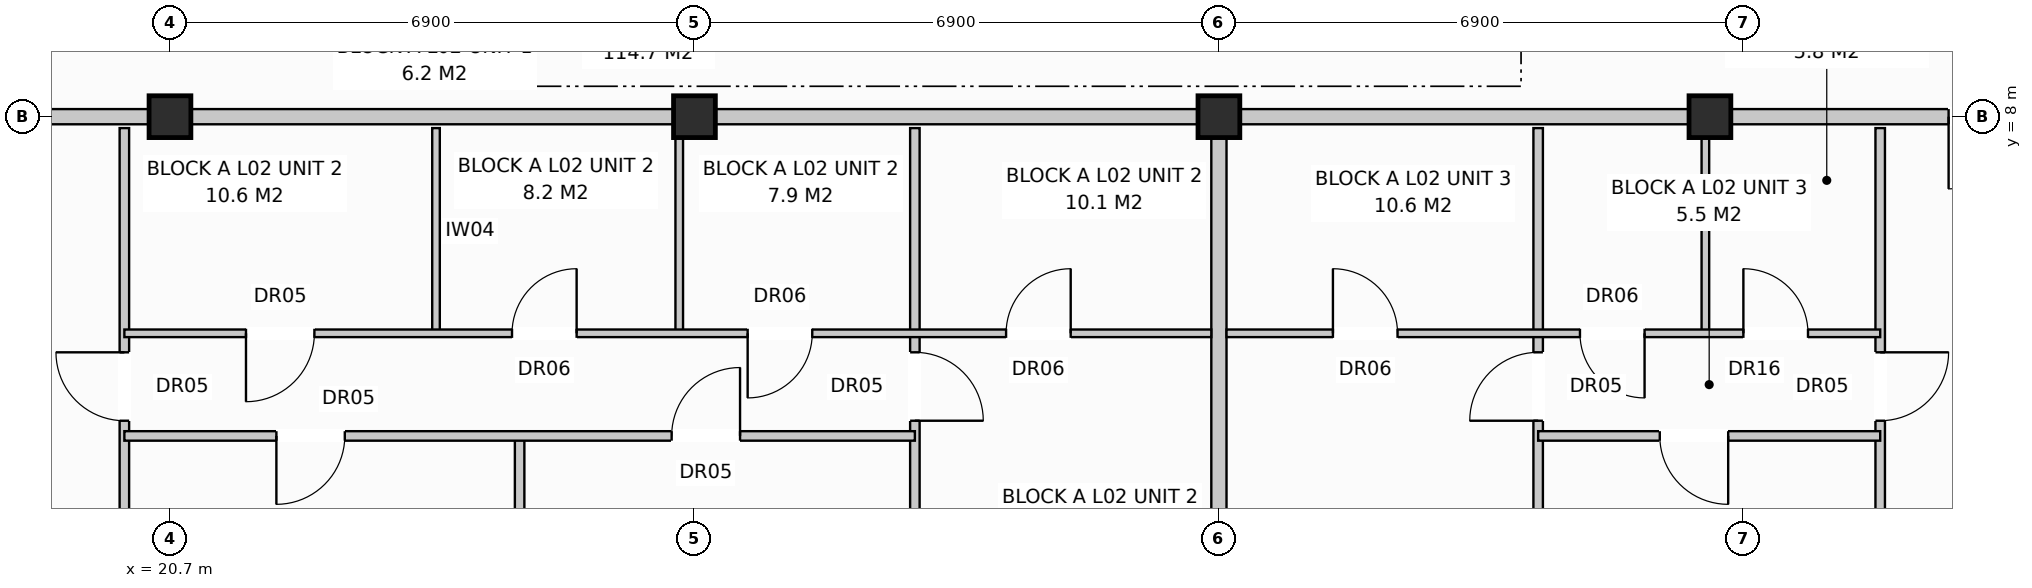
"""IFC4 building model, lengths in metres.
Left out: names, types, materials, properties, quantities, classifications, styles, units other than length and angle.
Written with IfcOpenShell. Run it as: python <this file> out.ifc"""

import sys

from ifc_helpers import new_model, si_unit, direction, frame, frame_2d, origin, origin_with_axes, origin_2d, place, context, subcontext, project, spatial, rectangle, extrude, element, fill, save


model = new_model("IFC4")
c1 = context("Model", 3, precision=1e-05, world=origin(), true_north=direction((0.0, 1.0)))
c2 = subcontext(c1, "Body", "Model", "MODEL_VIEW")
j1 = project(units=[si_unit("LENGTHUNIT", "METRE"), si_unit("PLANEANGLEUNIT", "RADIAN")], contexts=[c1])
p1 = place(None, origin())
s1 = spatial("IfcSite", under=j1, at=p1, CompositionType="ELEMENT")
p2 = place(p1, origin())
s2 = spatial("IfcBuilding", under=s1, at=p2, CompositionType="ELEMENT")
p3 = place(p2, frame((0.0, 0.0, 8.0)))
s3 = spatial("IfcBuildingStorey", under=s2, at=p3, CompositionType="ELEMENT", Elevation=8.0)
for number, where, z_axis, x_axis in (
    (1, (20.7, 8.0, 0.0), (0.0, 0.0, 1.0), (1.0, 0.0, 0.0)),
    (2, (27.6, 8.0, 0.0), (0.0, 0.0, 1.0), (1.0, 0.0, 0.0)),
    (3, (34.5, 8.0, 0.0), (0.0, 0.0, 1.0), (1.0, 0.0, 0.0)),
    (4, (40.96, 8.0, 0.0), (0.0, 0.0, 1.0), (1.0, 0.0, 0.0)),
):
    element("IfcColumn", number, at=place(p3, frame(where, z_axis=z_axis, x_axis=x_axis)), inside=s3, PredefinedType="COLUMN", context=c2, shape_type="SweptSolid", body=[
        extrude(rectangle(XDim=0.55, YDim=0.55, at=origin_2d()), origin(), (0.0, 0.0, 1.0), 3.2),
    ])
p4 = place(p3, frame((34.5, 7.85, 0.0), z_axis=(0.0, 0.0, 1.0), x_axis=(0.0, -1.0, 0.0)))
e5 = element("IfcWall", 5, at=p4, inside=s3, PredefinedType="PARTITIONING", context=c2, shape_type="SweptSolid", body=[
    extrude(rectangle(XDim=7.7, YDim=0.2, at=frame_2d((3.85, 0.0))), origin(), (0.0, 0.0, 1.0), 2.94),
])
p5 = place(p3, frame((13.8, 8.0, 0.0), z_axis=(0.0, 0.0, 1.0), x_axis=(1.0, 0.0, 0.0)))
e6 = element("IfcWall", 6, at=p5, inside=s3, PredefinedType="PARTITIONING", context=c2, shape_type="SweptSolid", body=[
    extrude(rectangle(XDim=20.7, YDim=0.2, at=frame_2d((10.35, 0.0))), origin(), (0.0, 0.0, 1.0), 2.38),
])
p6 = place(p5, frame((2.4, 0.0, 0.0)))
e7 = element("IfcOpeningElement", 7, at=p6, cuts=e6, PredefinedType="OPENING", context=c2, shape_type="SweptSolid", body=[
    extrude(rectangle(XDim=0.95, YDim=2.15, at=frame_2d((0.475, 1.075))), frame((0.0, 0.112, 0.0), z_axis=(0.0, -1.0, 0.0), x_axis=(1.0, 0.0, 0.0)), (0.0, 0.0, 1.0), 0.224),
])
p7 = place(p3, frame((20.1, 7.85, 0.0), z_axis=(0.0, 0.0, 1.0), x_axis=(0.0, -1.0, 0.0)))
e8 = element("IfcWall", 8, at=p7, inside=s3, PredefinedType="PARTITIONING", context=c2, shape_type="SweptSolid", body=[
    extrude(rectangle(XDim=7.65, YDim=0.125, at=frame_2d((3.825, 0.0))), origin(), (0.0, 0.0, 1.0), 2.94),
])
p8 = place(p7, frame((2.95, 0.0, 0.0)))
e9 = element("IfcOpeningElement", 9, at=p8, cuts=e8, PredefinedType="OPENING", context=c2, shape_type="SweptSolid", body=[
    extrude(rectangle(XDim=0.9, YDim=2.1, at=frame_2d((0.45, 1.05))), frame((0.0, 0.074, 0.0), z_axis=(0.0, -1.0, 0.0), x_axis=(1.0, 0.0, 0.0)), (0.0, 0.0, 1.0), 0.149),
])
for number, where, z_axis, x_axis in (
    (10, (24.2, 7.85, 0.0), (0.0, 0.0, 1.0), (0.0, -1.0, 0.0)),
    (11, (27.4, 7.85, 0.0), (0.0, 0.0, 1.0), (0.0, -1.0, 0.0)),
):
    element("IfcWall", number, at=place(p3, frame(where, z_axis=z_axis, x_axis=x_axis)), inside=s3, PredefinedType="PARTITIONING", context=c2, shape_type="SweptSolid", body=[
        extrude(rectangle(XDim=2.7, YDim=0.1, at=frame_2d((1.35, 0.0))), origin(), (0.0, 0.0, 1.0), 2.94),
    ])
p9 = place(p3, frame((25.3, 3.8, 0.0), z_axis=(0.0, 0.0, 1.0), x_axis=(0.0, -1.0, 0.0)))
e12 = element("IfcWall", 12, at=p9, inside=s3, PredefinedType="PARTITIONING", context=c2, shape_type="SweptSolid", body=[
    extrude(rectangle(XDim=3.6, YDim=0.125, at=frame_2d((1.8, 0.0))), origin(), (0.0, 0.0, 1.0), 2.59),
])
p10 = place(p3, frame((30.5, 7.85, 0.0), z_axis=(0.0, 0.0, 1.0), x_axis=(0.0, -1.0, 0.0)))
e13 = element("IfcWall", 13, at=p10, inside=s3, PredefinedType="PARTITIONING", context=c2, shape_type="SweptSolid", body=[
    extrude(rectangle(XDim=7.65, YDim=0.125, at=frame_2d((3.825, 0.0))), origin(), (0.0, 0.0, 1.0), 2.94),
])
p11 = place(p10, frame((2.95, 0.0, 0.0)))
e14 = element("IfcOpeningElement", 14, at=p11, cuts=e13, PredefinedType="OPENING", context=c2, shape_type="SweptSolid", body=[
    extrude(rectangle(XDim=0.9, YDim=2.1, at=frame_2d((0.45, 1.05))), frame((0.0, 0.074, 0.0), z_axis=(0.0, -1.0, 0.0), x_axis=(1.0, 0.0, 0.0)), (0.0, 0.0, 1.0), 0.149),
])
p12 = place(p3, frame((20.1, 5.15, 0.0), z_axis=(0.0, 0.0, 1.0), x_axis=(1.0, 0.0, 0.0)))
e15 = element("IfcWall", 15, at=p12, inside=s3, PredefinedType="PARTITIONING", context=c2, shape_type="SweptSolid", body=[
    extrude(rectangle(XDim=14.3, YDim=0.1, at=frame_2d((7.15, 0.0))), origin(), (0.0, 0.0, 1.0), 2.94),
])
p13 = place(p12, frame((1.6, 0.0, 0.0)))
e16 = element("IfcOpeningElement", 16, at=p13, cuts=e15, PredefinedType="OPENING", context=c2, shape_type="SweptSolid", body=[
    extrude(rectangle(XDim=0.9, YDim=2.1, at=frame_2d((0.45, 1.05))), frame((0.0, 0.062, 0.0), z_axis=(0.0, -1.0, 0.0), x_axis=(1.0, 0.0, 0.0)), (0.0, 0.0, 1.0), 0.124),
])
p14 = place(p12, frame((5.1, 0.0, 0.0)))
e17 = element("IfcOpeningElement", 17, at=p14, cuts=e15, PredefinedType="OPENING", context=c2, shape_type="SweptSolid", body=[
    extrude(rectangle(XDim=0.85, YDim=2.05, at=frame_2d((0.425, 1.025))), frame((0.0, 0.062, 0.0), z_axis=(0.0, -1.0, 0.0), x_axis=(1.0, 0.0, 0.0)), (0.0, 0.0, 1.0), 0.124),
])
p15 = place(p12, frame((8.2, 0.0, 0.0)))
e18 = element("IfcOpeningElement", 18, at=p15, cuts=e15, PredefinedType="OPENING", context=c2, shape_type="SweptSolid", body=[
    extrude(rectangle(XDim=0.85, YDim=2.05, at=frame_2d((0.425, 1.025))), frame((0.0, 0.062, 0.0), z_axis=(0.0, -1.0, 0.0), x_axis=(1.0, 0.0, 0.0)), (0.0, 0.0, 1.0), 0.124),
])
p16 = place(p12, frame((11.6, 0.0, 0.0)))
e19 = element("IfcOpeningElement", 19, at=p16, cuts=e15, PredefinedType="OPENING", context=c2, shape_type="SweptSolid", body=[
    extrude(rectangle(XDim=0.85, YDim=2.05, at=frame_2d((0.425, 1.025))), frame((0.0, 0.062, 0.0), z_axis=(0.0, -1.0, 0.0), x_axis=(1.0, 0.0, 0.0)), (0.0, 0.0, 1.0), 0.124),
])
p17 = place(p3, frame((20.1, 3.8, 0.0), z_axis=(0.0, 0.0, 1.0), x_axis=(1.0, 0.0, 0.0)))
e20 = element("IfcWall", 20, at=p17, inside=s3, PredefinedType="PARTITIONING", context=c2, shape_type="SweptSolid", body=[
    extrude(rectangle(XDim=10.4, YDim=0.125, at=frame_2d((5.2, 0.0))), origin(), (0.0, 0.0, 1.0), 2.94),
])
p18 = place(p17, frame((2.0, 0.0, 0.0)))
e21 = element("IfcOpeningElement", 21, at=p18, cuts=e20, PredefinedType="OPENING", context=c2, shape_type="SweptSolid", body=[
    extrude(rectangle(XDim=0.9, YDim=2.1, at=frame_2d((0.45, 1.05))), frame((0.0, 0.074, 0.0), z_axis=(0.0, -1.0, 0.0), x_axis=(1.0, 0.0, 0.0)), (0.0, 0.0, 1.0), 0.149),
])
p19 = place(p17, frame((7.2, 0.0, 0.0)))
e22 = element("IfcOpeningElement", 22, at=p19, cuts=e20, PredefinedType="OPENING", context=c2, shape_type="SweptSolid", body=[
    extrude(rectangle(XDim=0.9, YDim=2.1, at=frame_2d((0.45, 1.05))), frame((0.0, 0.074, 0.0), z_axis=(0.0, -1.0, 0.0), x_axis=(1.0, 0.0, 0.0)), (0.0, 0.0, 1.0), 0.149),
])
p20 = place(p3, frame((34.5, 8.0, 0.0), z_axis=(0.0, 0.0, 1.0), x_axis=(1.0, 0.0, 0.0)))
e23 = element("IfcWall", 23, at=p20, inside=s3, PredefinedType="PARTITIONING", context=c2, shape_type="SweptSolid", body=[
    extrude(rectangle(XDim=13.8, YDim=0.2, at=frame_2d((6.9, 0.0))), origin(), (0.0, 0.0, 1.0), 2.38),
])
p21 = place(p20, frame((9.6, 0.0, 0.0)))
e24 = element("IfcOpeningElement", 24, at=p21, cuts=e23, PredefinedType="OPENING", context=c2, shape_type="SweptSolid", body=[
    extrude(rectangle(XDim=0.95, YDim=2.15, at=frame_2d((0.475, 1.075))), frame((0.0, 0.112, 0.0), z_axis=(0.0, -1.0, 0.0), x_axis=(1.0, 0.0, 0.0)), (0.0, 0.0, 1.0), 0.224),
])
p22 = place(p3, frame((43.2, 7.85, 0.0), z_axis=(0.0, 0.0, 1.0), x_axis=(0.0, -1.0, 0.0)))
e25 = element("IfcWall", 25, at=p22, inside=s3, PredefinedType="PARTITIONING", context=c2, shape_type="SweptSolid", body=[
    extrude(rectangle(XDim=7.65, YDim=0.125, at=frame_2d((3.825, 0.0))), origin(), (0.0, 0.0, 1.0), 2.59),
])
p23 = place(p22, frame((2.95, 0.0, 0.0)))
e26 = element("IfcOpeningElement", 26, at=p23, cuts=e25, PredefinedType="OPENING", context=c2, shape_type="SweptSolid", body=[
    extrude(rectangle(XDim=0.9, YDim=2.1, at=frame_2d((0.45, 1.05))), frame((0.0, 0.074, 0.0), z_axis=(0.0, -1.0, 0.0), x_axis=(1.0, 0.0, 0.0)), (0.0, 0.0, 1.0), 0.149),
])
p24 = place(p3, frame((38.7, 7.85, 0.0), z_axis=(0.0, 0.0, 1.0), x_axis=(0.0, -1.0, 0.0)))
e27 = element("IfcWall", 27, at=p24, inside=s3, PredefinedType="PARTITIONING", context=c2, shape_type="SweptSolid", body=[
    extrude(rectangle(XDim=7.65, YDim=0.125, at=frame_2d((3.825, 0.0))), origin(), (0.0, 0.0, 1.0), 2.94),
])
p25 = place(p24, frame((2.95, 0.0, 0.0)))
e28 = element("IfcOpeningElement", 28, at=p25, cuts=e27, PredefinedType="OPENING", context=c2, shape_type="SweptSolid", body=[
    extrude(rectangle(XDim=0.9, YDim=2.1, at=frame_2d((0.45, 1.05))), frame((0.0, 0.074, 0.0), z_axis=(0.0, -1.0, 0.0), x_axis=(1.0, 0.0, 0.0)), (0.0, 0.0, 1.0), 0.149),
])
p26 = place(p3, frame((40.9, 7.85, 0.0), z_axis=(0.0, 0.0, 1.0), x_axis=(0.0, -1.0, 0.0)))
e29 = element("IfcWall", 29, at=p26, inside=s3, PredefinedType="PARTITIONING", context=c2, shape_type="SweptSolid", body=[
    extrude(rectangle(XDim=2.7, YDim=0.1, at=frame_2d((1.35, 0.0))), origin(), (0.0, 0.0, 1.0), 2.94),
])
p27 = place(p3, frame((34.6, 5.15, 0.0), z_axis=(0.0, 0.0, 1.0), x_axis=(1.0, 0.0, 0.0)))
e30 = element("IfcWall", 30, at=p27, inside=s3, PredefinedType="PARTITIONING", context=c2, shape_type="SweptSolid", body=[
    extrude(rectangle(XDim=8.6, YDim=0.1, at=frame_2d((4.3, 0.0))), origin(), (0.0, 0.0, 1.0), 2.94),
])
p28 = place(p27, frame((1.4, 0.0, 0.0)))
e31 = element("IfcOpeningElement", 31, at=p28, cuts=e30, PredefinedType="OPENING", context=c2, shape_type="SweptSolid", body=[
    extrude(rectangle(XDim=0.85, YDim=2.05, at=frame_2d((0.425, 1.025))), frame((0.0, 0.062, 0.0), z_axis=(0.0, -1.0, 0.0), x_axis=(1.0, 0.0, 0.0)), (0.0, 0.0, 1.0), 0.124),
])
p29 = place(p27, frame((4.65, 0.0, 0.0)))
e32 = element("IfcOpeningElement", 32, at=p29, cuts=e30, PredefinedType="OPENING", context=c2, shape_type="SweptSolid", body=[
    extrude(rectangle(XDim=0.85, YDim=2.05, at=frame_2d((0.425, 1.025))), frame((0.0, 0.062, 0.0), z_axis=(0.0, -1.0, 0.0), x_axis=(1.0, 0.0, 0.0)), (0.0, 0.0, 1.0), 0.124),
])
p30 = place(p27, frame((6.8, 0.0, 0.0)))
e33 = element("IfcOpeningElement", 33, at=p30, cuts=e30, PredefinedType="OPENING", context=c2, shape_type="SweptSolid", body=[
    extrude(rectangle(XDim=0.85, YDim=2.1, at=frame_2d((0.425, 1.05))), frame((0.0, 0.062, 0.0), z_axis=(0.0, -1.0, 0.0), x_axis=(1.0, 0.0, 0.0)), (0.0, 0.0, 1.0), 0.124),
])
p31 = place(p3, frame((38.7, 3.8, 0.0), z_axis=(0.0, 0.0, 1.0), x_axis=(1.0, 0.0, 0.0)))
e34 = element("IfcWall", 34, at=p31, inside=s3, PredefinedType="PARTITIONING", context=c2, shape_type="SweptSolid", body=[
    extrude(rectangle(XDim=4.5, YDim=0.125, at=frame_2d((2.25, 0.0))), origin(), (0.0, 0.0, 1.0), 2.94),
])
p32 = place(p31, frame((1.6, 0.0, 0.0)))
e35 = element("IfcOpeningElement", 35, at=p32, cuts=e34, PredefinedType="OPENING", context=c2, shape_type="SweptSolid", body=[
    extrude(rectangle(XDim=0.9, YDim=2.1, at=frame_2d((0.45, 1.05))), frame((0.0, 0.074, 0.0), z_axis=(0.0, -1.0, 0.0), x_axis=(1.0, 0.0, 0.0)), (0.0, 0.0, 1.0), 0.149),
])
p33 = place(p8, frame((0.9, 0.0, 0.0), z_axis=(0.0, 0.0, 1.0), x_axis=(-1.0, 0.0, 0.0)))
e36 = element("IfcDoor", 36, at=p33, inside=s3, OperationType="SINGLE_SWING_LEFT", PredefinedType="DOOR", context=c2, shape_type="SweptSolid", body=[
    extrude(rectangle(XDim=0.9, YDim=2.1, at=frame_2d((0.45, 1.05))), frame((0.0, 0.025, 0.0), z_axis=(0.0, -1.0, 0.0), x_axis=(1.0, 0.0, 0.0)), (0.0, 0.0, 1.0), 0.05),
])
fill(e9, e36)
p34 = place(p11, origin_with_axes())
e37 = element("IfcDoor", 37, at=p34, inside=s3, OperationType="SINGLE_SWING_RIGHT", PredefinedType="DOOR", context=c2, shape_type="SweptSolid", body=[
    extrude(rectangle(XDim=0.9, YDim=2.1, at=frame_2d((0.45, 1.05))), frame((0.0, 0.025, 0.0), z_axis=(0.0, -1.0, 0.0), x_axis=(1.0, 0.0, 0.0)), (0.0, 0.0, 1.0), 0.05),
])
fill(e14, e37)
p35 = place(p13, frame((0.9, 0.0, 0.0), z_axis=(0.0, 0.0, 1.0), x_axis=(-1.0, 0.0, 0.0)))
e38 = element("IfcDoor", 38, at=p35, inside=s3, OperationType="SINGLE_SWING_LEFT", PredefinedType="DOOR", context=c2, shape_type="SweptSolid", body=[
    extrude(rectangle(XDim=0.9, YDim=2.1, at=frame_2d((0.45, 1.05))), frame((0.0, 0.025, 0.0), z_axis=(0.0, -1.0, 0.0), x_axis=(1.0, 0.0, 0.0)), (0.0, 0.0, 1.0), 0.05),
])
fill(e16, e38)
p36 = place(p14, origin_with_axes())
e39 = element("IfcDoor", 39, at=p36, inside=s3, OperationType="SINGLE_SWING_RIGHT", PredefinedType="DOOR", context=c2, shape_type="SweptSolid", body=[
    extrude(rectangle(XDim=0.85, YDim=2.05, at=frame_2d((0.425, 1.025))), frame((0.0, 0.025, 0.0), z_axis=(0.0, -1.0, 0.0), x_axis=(1.0, 0.0, 0.0)), (0.0, 0.0, 1.0), 0.05),
])
fill(e17, e39)
p37 = place(p15, frame((0.85, 0.0, 0.0), z_axis=(0.0, 0.0, 1.0), x_axis=(-1.0, 0.0, 0.0)))
e40 = element("IfcDoor", 40, at=p37, inside=s3, OperationType="SINGLE_SWING_LEFT", PredefinedType="DOOR", context=c2, shape_type="SweptSolid", body=[
    extrude(rectangle(XDim=0.85, YDim=2.05, at=frame_2d((0.425, 1.025))), frame((0.0, 0.025, 0.0), z_axis=(0.0, -1.0, 0.0), x_axis=(1.0, 0.0, 0.0)), (0.0, 0.0, 1.0), 0.05),
])
fill(e18, e40)
p38 = place(p16, origin_with_axes())
e41 = element("IfcDoor", 41, at=p38, inside=s3, OperationType="SINGLE_SWING_RIGHT", PredefinedType="DOOR", context=c2, shape_type="SweptSolid", body=[
    extrude(rectangle(XDim=0.85, YDim=2.05, at=frame_2d((0.425, 1.025))), frame((0.0, 0.025, 0.0), z_axis=(0.0, -1.0, 0.0), x_axis=(1.0, 0.0, 0.0)), (0.0, 0.0, 1.0), 0.05),
])
fill(e19, e41)
p39 = place(p18, frame((0.9, 0.0, 0.0), z_axis=(0.0, 0.0, 1.0), x_axis=(-1.0, 0.0, 0.0)))
e42 = element("IfcDoor", 42, at=p39, inside=s3, OperationType="SINGLE_SWING_LEFT", PredefinedType="DOOR", context=c2, shape_type="SweptSolid", body=[
    extrude(rectangle(XDim=0.9, YDim=2.1, at=frame_2d((0.45, 1.05))), frame((0.0, 0.025, 0.0), z_axis=(0.0, -1.0, 0.0), x_axis=(1.0, 0.0, 0.0)), (0.0, 0.0, 1.0), 0.05),
])
fill(e21, e42)
p40 = place(p19, origin_with_axes())
e43 = element("IfcDoor", 43, at=p40, inside=s3, OperationType="SINGLE_SWING_RIGHT", PredefinedType="DOOR", context=c2, shape_type="SweptSolid", body=[
    extrude(rectangle(XDim=0.9, YDim=2.1, at=frame_2d((0.45, 1.05))), frame((0.0, 0.025, 0.0), z_axis=(0.0, -1.0, 0.0), x_axis=(1.0, 0.0, 0.0)), (0.0, 0.0, 1.0), 0.05),
])
fill(e22, e43)
p41 = place(p21, frame((0.95, 0.0, 0.0), z_axis=(0.0, 0.0, 1.0), x_axis=(-1.0, 0.0, 0.0)))
e44 = element("IfcDoor", 44, at=p41, inside=s3, OperationType="SINGLE_SWING_LEFT", PredefinedType="DOOR", context=c2, shape_type="SweptSolid", body=[
    extrude(rectangle(XDim=0.95, YDim=2.15, at=frame_2d((0.475, 1.075))), frame((0.0, 0.025, 0.0), z_axis=(0.0, -1.0, 0.0), x_axis=(1.0, 0.0, 0.0)), (0.0, 0.0, 1.0), 0.05),
])
fill(e24, e44)
p42 = place(p23, origin_with_axes())
e45 = element("IfcDoor", 45, at=p42, inside=s3, OperationType="SINGLE_SWING_LEFT", PredefinedType="DOOR", context=c2, shape_type="SweptSolid", body=[
    extrude(rectangle(XDim=0.9, YDim=2.1, at=frame_2d((0.45, 1.05))), frame((0.0, 0.025, 0.0), z_axis=(0.0, -1.0, 0.0), x_axis=(1.0, 0.0, 0.0)), (0.0, 0.0, 1.0), 0.05),
])
fill(e26, e45)
p43 = place(p25, frame((0.9, 0.0, 0.0), z_axis=(0.0, 0.0, 1.0), x_axis=(-1.0, 0.0, 0.0)))
e46 = element("IfcDoor", 46, at=p43, inside=s3, OperationType="SINGLE_SWING_RIGHT", PredefinedType="DOOR", context=c2, shape_type="SweptSolid", body=[
    extrude(rectangle(XDim=0.9, YDim=2.1, at=frame_2d((0.45, 1.05))), frame((0.0, 0.025, 0.0), z_axis=(0.0, -1.0, 0.0), x_axis=(1.0, 0.0, 0.0)), (0.0, 0.0, 1.0), 0.05),
])
fill(e28, e46)
p44 = place(p28, origin_with_axes())
e47 = element("IfcDoor", 47, at=p44, inside=s3, OperationType="SINGLE_SWING_LEFT", PredefinedType="DOOR", context=c2, shape_type="SweptSolid", body=[
    extrude(rectangle(XDim=0.85, YDim=2.05, at=frame_2d((0.425, 1.025))), frame((0.0, 0.025, 0.0), z_axis=(0.0, -1.0, 0.0), x_axis=(1.0, 0.0, 0.0)), (0.0, 0.0, 1.0), 0.05),
])
fill(e31, e47)
p45 = place(p29, frame((0.85, 0.0, 0.0), z_axis=(0.0, 0.0, 1.0), x_axis=(-1.0, 0.0, 0.0)))
e48 = element("IfcDoor", 48, at=p45, inside=s3, OperationType="SINGLE_SWING_RIGHT", PredefinedType="DOOR", context=c2, shape_type="SweptSolid", body=[
    extrude(rectangle(XDim=0.85, YDim=2.05, at=frame_2d((0.425, 1.025))), frame((0.0, 0.025, 0.0), z_axis=(0.0, -1.0, 0.0), x_axis=(1.0, 0.0, 0.0)), (0.0, 0.0, 1.0), 0.05),
])
fill(e32, e48)
p46 = place(p30, origin_with_axes())
e49 = element("IfcDoor", 49, at=p46, inside=s3, OperationType="SINGLE_SWING_LEFT", PredefinedType="DOOR", context=c2, shape_type="SweptSolid", body=[
    extrude(rectangle(XDim=0.85, YDim=2.1, at=frame_2d((0.425, 1.05))), frame((0.0, 0.025, 0.0), z_axis=(0.0, -1.0, 0.0), x_axis=(1.0, 0.0, 0.0)), (0.0, 0.0, 1.0), 0.05),
])
fill(e33, e49)
p47 = place(p32, frame((0.9, 0.0, 0.0), z_axis=(0.0, 0.0, 1.0), x_axis=(-1.0, 0.0, 0.0)))
e50 = element("IfcDoor", 50, at=p47, inside=s3, OperationType="SINGLE_SWING_RIGHT", PredefinedType="DOOR", context=c2, shape_type="SweptSolid", body=[
    extrude(rectangle(XDim=0.9, YDim=2.1, at=frame_2d((0.45, 1.05))), frame((0.0, 0.025, 0.0), z_axis=(0.0, -1.0, 0.0), x_axis=(1.0, 0.0, 0.0)), (0.0, 0.0, 1.0), 0.05),
])
fill(e35, e50)
save(model, sys.argv[1])
